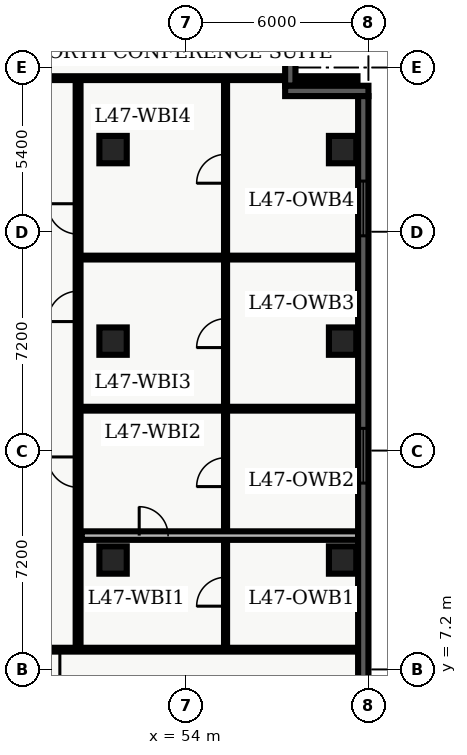
"""IFC4 building model, lengths in metres.
Left out: names, types, materials, properties, quantities, classifications, styles, units other than length and angle.
Written with IfcOpenShell. Run it as: python <this file> out.ifc"""

import sys

from ifc_helpers import new_model, entity, si_unit, converted_unit, direction, frame, origin_with_axes, origin_2d_with_axis, place, context, subcontext, project, spatial, polyline, rectangle, outline, extrude, element, fill, save


model = new_model("IFC4")
c1 = context("Model", 3, precision=1e-05, world=origin_with_axes(), true_north=direction((0.0, 1.0)))
c2 = subcontext(c1, "Body", "Model", "MODEL_VIEW")
j1 = project(units=[si_unit("LENGTHUNIT", "METRE"), converted_unit("PLANEANGLEUNIT", "DEGREE", entity("IfcPlaneAngleMeasure", 0.017), si_unit("PLANEANGLEUNIT", "RADIAN"), dimensions=[0, 0, 0, 0, 0, 0, 0])], contexts=[c1])
p1 = place(None, origin_with_axes())
s1 = spatial("IfcSite", under=j1, at=p1, CompositionType="ELEMENT")
p2 = place(p1, origin_with_axes())
s2 = spatial("IfcBuilding", under=s1, at=p2, CompositionType="ELEMENT")
p3 = place(p2, frame((0.0, 0.0, 192.6), z_axis=(0.0, 0.0, 1.0), x_axis=(1.0, 0.0, 0.0)))
s3 = spatial("IfcBuildingStorey", under=s2, at=p3, CompositionType="ELEMENT", Elevation=192.6)
for number, where, z_axis, x_axis in (
    (1, (51.6, 10.8, 0.0), (0.0, 0.0, 1.0), (1.0, 0.0, 0.0)),
    (2, (51.6, 18.0, 0.0), (0.0, 0.0, 1.0), (1.0, 0.0, 0.0)),
    (3, (51.6, 24.3, 0.0), (0.0, 0.0, 1.0), (1.0, 0.0, 0.0)),
    (4, (59.15, 10.8, 0.0), (0.0, 0.0, 1.0), (1.0, 0.0, 0.0)),
    (5, (59.15, 18.0, 0.0), (0.0, 0.0, 1.0), (1.0, 0.0, 0.0)),
    (6, (59.15, 24.3, 0.0), (0.0, 0.0, 1.0), (1.0, 0.0, 0.0)),
):
    element("IfcColumn", number, at=place(p3, frame(where, z_axis=z_axis, x_axis=x_axis)), inside=s3, PredefinedType="COLUMN", context=c2, shape_type="SweptSolid", body=[
        extrude(rectangle(XDim=0.9, YDim=0.9, at=origin_2d_with_axis()), origin_with_axes(), (0.0, 0.0, 1.0), 3.9),
    ])
p4 = place(p3, frame((50.45, 7.85, 0.0), z_axis=(0.0, 0.0, 1.0), x_axis=(0.0, 1.0, 0.0)))
e7 = element("IfcWall", 7, at=p4, inside=s3, PredefinedType="PARTITIONING", context=c2, shape_type="SweptSolid", body=[
    extrude(outline(polyline([(0.0, -0.08), (18.8, -0.08), (18.8, 0.08), (0.0, 0.08), (0.0, -0.08)])), origin_with_axes(), (0.0, 0.0, 1.0), 2.7),
])
p5 = place(p4, frame((5.84, 0.0, 0.0), z_axis=(0.0, 0.0, 1.0), x_axis=(1.0, 0.0, 0.0)))
e8 = element("IfcOpeningElement", 8, at=p5, cuts=e7, PredefinedType="OPENING", context=c2, shape_type="SweptSolid", body=[
    extrude(rectangle(XDim=1.0, YDim=0.18, at=origin_2d_with_axis()), origin_with_axes(), (0.0, 0.0, 1.0), 2.15),
])
p6 = place(p4, frame((11.293, 0.0, 0.0), z_axis=(0.0, 0.0, 1.0), x_axis=(1.0, 0.0, 0.0)))
e9 = element("IfcOpeningElement", 9, at=p6, cuts=e7, PredefinedType="OPENING", context=c2, shape_type="SweptSolid", body=[
    extrude(rectangle(XDim=1.0, YDim=0.18, at=origin_2d_with_axis()), origin_with_axes(), (0.0, 0.0, 1.0), 2.15),
])
p7 = place(p4, frame((14.169, 0.0, 0.0), z_axis=(0.0, 0.0, 1.0), x_axis=(1.0, 0.0, 0.0)))
e10 = element("IfcOpeningElement", 10, at=p7, cuts=e7, PredefinedType="OPENING", context=c2, shape_type="SweptSolid", body=[
    extrude(rectangle(XDim=1.0, YDim=0.18, at=origin_2d_with_axis()), origin_with_axes(), (0.0, 0.0, 1.0), 2.15),
])
p8 = place(p3, frame((59.665, 7.85, 0.0), z_axis=(0.0, 0.0, 1.0), x_axis=(-1.0, 0.0, 0.0)))
e11 = element("IfcWall", 11, at=p8, inside=s3, PredefinedType="PARTITIONING", context=c2, shape_type="SweptSolid", body=[
    extrude(outline(polyline([(0.0, -0.062), (11.615, -0.062), (11.615, 0.062), (0.0, 0.062), (0.0, -0.062)])), origin_with_axes(), (0.0, 0.0, 1.0), 2.7),
])
p9 = place(p8, frame((10.315, 0.0, 0.0), z_axis=(0.0, 0.0, 1.0), x_axis=(1.0, 0.0, 0.0)))
e12 = element("IfcOpeningElement", 12, at=p9, cuts=e11, PredefinedType="OPENING", context=c2, shape_type="SweptSolid", body=[
    extrude(rectangle(XDim=1.0, YDim=0.145, at=origin_2d_with_axis()), origin_with_axes(), (0.0, 0.0, 1.0), 2.15),
])
p10 = place(p3, frame((38.735, 26.65, 0.0), z_axis=(0.0, 0.0, 1.0), x_axis=(1.0, 0.0, 0.0)))
e13 = element("IfcWall", 13, at=p10, inside=s3, PredefinedType="PARTITIONING", context=c2, shape_type="SweptSolid", body=[
    extrude(outline(polyline([(0.0, -0.062), (20.905, -0.062), (20.905, 0.062), (0.0, 0.062), (0.0, -0.062)])), origin_with_axes(), (0.0, 0.0, 1.0), 2.7),
])
p11 = place(p10, frame((4.265, 0.0, 0.0), z_axis=(0.0, 0.0, 1.0), x_axis=(1.0, 0.0, 0.0)))
e14 = element("IfcOpeningElement", 14, at=p11, cuts=e13, PredefinedType="OPENING", context=c2, shape_type="SweptSolid", body=[
    extrude(rectangle(XDim=1.0, YDim=0.145, at=origin_2d_with_axis()), origin_with_axes(), (0.0, 0.0, 1.0), 2.15),
])
p12 = place(p3, frame((55.3, 7.98, 0.0), z_axis=(0.0, 0.0, 1.0), x_axis=(0.0, 1.0, 0.0)))
e15 = element("IfcWall", 15, at=p12, inside=s3, PredefinedType="PARTITIONING", context=c2, shape_type="SweptSolid", body=[
    extrude(outline(polyline([(0.0, -0.05), (18.54, -0.05), (18.54, 0.05), (0.0, 0.05), (0.0, -0.05)])), origin_with_axes(), (0.0, 0.0, 1.0), 2.7),
])
p13 = place(p12, frame((1.776, 0.0, 0.0), z_axis=(0.0, 0.0, 1.0), x_axis=(1.0, 0.0, 0.0)))
e16 = element("IfcOpeningElement", 16, at=p13, cuts=e15, PredefinedType="OPENING", context=c2, shape_type="SweptSolid", body=[
    extrude(rectangle(XDim=0.95, YDim=0.12, at=origin_2d_with_axis()), origin_with_axes(), (0.0, 0.0, 1.0), 2.15),
])
p14 = place(p12, frame((5.71, 0.0, 0.0), z_axis=(0.0, 0.0, 1.0), x_axis=(1.0, 0.0, 0.0)))
e17 = element("IfcOpeningElement", 17, at=p14, cuts=e15, PredefinedType="OPENING", context=c2, shape_type="SweptSolid", body=[
    extrude(rectangle(XDim=0.95, YDim=0.12, at=origin_2d_with_axis()), origin_with_axes(), (0.0, 0.0, 1.0), 2.15),
])
p15 = place(p12, frame((10.283, 0.0, 0.0), z_axis=(0.0, 0.0, 1.0), x_axis=(1.0, 0.0, 0.0)))
e18 = element("IfcOpeningElement", 18, at=p15, cuts=e15, PredefinedType="OPENING", context=c2, shape_type="SweptSolid", body=[
    extrude(rectangle(XDim=0.95, YDim=0.12, at=origin_2d_with_axis()), origin_with_axes(), (0.0, 0.0, 1.0), 2.15),
])
p16 = place(p12, frame((15.689, 0.0, 0.0), z_axis=(0.0, 0.0, 1.0), x_axis=(1.0, 0.0, 0.0)))
e19 = element("IfcOpeningElement", 19, at=p16, cuts=e15, PredefinedType="OPENING", context=c2, shape_type="SweptSolid", body=[
    extrude(rectangle(XDim=0.95, YDim=0.12, at=origin_2d_with_axis()), origin_with_axes(), (0.0, 0.0, 1.0), 2.15),
])
p17 = place(p3, frame((50.57, 11.603, 0.0), z_axis=(0.0, 0.0, 1.0), x_axis=(1.0, 0.0, 0.0)))
e20 = element("IfcWall", 20, at=p17, inside=s3, PredefinedType="PARTITIONING", context=c2, shape_type="SweptSolid", body=[
    extrude(outline(polyline([(0.0, -0.14), (9.095, -0.14), (9.095, 0.14), (0.0, 0.14), (0.0, -0.14)])), origin_with_axes(), (0.0, 0.0, 1.0), 2.7),
])
p18 = place(p17, frame((2.365, 0.0, 0.0), z_axis=(0.0, 0.0, 1.0), x_axis=(1.0, 0.0, 0.0)))
e21 = element("IfcOpeningElement", 21, at=p18, cuts=e20, PredefinedType="OPENING", context=c2, shape_type="SweptSolid", body=[
    extrude(rectangle(XDim=0.95, YDim=0.3, at=origin_2d_with_axis()), origin_with_axes(), (0.0, 0.0, 1.0), 2.15),
])
for number, where, z_axis, x_axis in (
    (22, (50.57, 15.777, 0.0), (0.0, 0.0, 1.0), (1.0, 0.0, 0.0)),
    (23, (50.57, 20.748, 0.0), (0.0, 0.0, 1.0), (1.0, 0.0, 0.0)),
):
    element("IfcWall", number, at=place(p3, frame(where, z_axis=z_axis, x_axis=x_axis)), inside=s3, PredefinedType="PARTITIONING", context=c2, shape_type="SweptSolid", body=[
        extrude(outline(polyline([(0.0, -0.062), (9.095, -0.062), (9.095, 0.062), (0.0, 0.062), (0.0, -0.062)])), origin_with_axes(), (0.0, 0.0, 1.0), 2.7),
    ])
p19 = place(p3, frame((57.43, 28.46, 0.0), z_axis=(0.0, 0.0, 1.0), x_axis=(0.0, -1.0, 0.0)))
e24 = element("IfcWall", 24, at=p19, inside=s3, PredefinedType="SOLIDWALL", context=c2, shape_type="SweptSolid", body=[
    extrude(outline(polyline([(0.0, -0.17), (2.06, -0.17), (2.06, 0.17), (0.0, 0.17), (0.0, -0.17)])), origin_with_axes(), (0.0, 0.0, 1.0), 3.66),
])
p20 = place(p3, frame((57.26, 26.23, 0.0), z_axis=(0.0, 0.0, 1.0), x_axis=(1.0, 0.0, 0.0)))
e25 = element("IfcWall", 25, at=p20, inside=s3, PredefinedType="SOLIDWALL", context=c2, shape_type="SweptSolid", body=[
    extrude(outline(polyline([(0.0, -0.17), (2.74, -0.17), (2.74, 0.17), (0.0, 0.17), (0.0, -0.17)])), origin_with_axes(), (0.0, 0.0, 1.0), 3.66),
])
p21 = place(p3, frame((59.83, 26.06, 0.0), z_axis=(0.0, 0.0, 1.0), x_axis=(0.0, -1.0, 0.0)))
e26 = element("IfcWall", 26, at=p21, inside=s3, PredefinedType="SOLIDWALL", context=c2, shape_type="SweptSolid", body=[
    extrude(outline(polyline([(0.0, -0.17), (23.66, -0.17), (23.66, 0.17), (0.0, 0.17), (0.0, -0.17)])), origin_with_axes(), (0.0, 0.0, 1.0), 3.66),
])
p22 = place(p21, frame((3.696, 0.0, 0.45), z_axis=(0.0, 0.0, 1.0), x_axis=(1.0, 0.0, 0.0)))
e27 = element("IfcOpeningElement", 27, at=p22, cuts=e26, PredefinedType="OPENING", context=c2, shape_type="SweptSolid", body=[
    extrude(rectangle(XDim=1.8, YDim=0.36, at=origin_2d_with_axis()), origin_with_axes(), (0.0, 0.0, 1.0), 2.1),
])
p23 = place(p21, frame((11.83, 0.0, 0.45), z_axis=(0.0, 0.0, 1.0), x_axis=(1.0, 0.0, 0.0)))
e28 = element("IfcOpeningElement", 28, at=p23, cuts=e26, PredefinedType="OPENING", context=c2, shape_type="SweptSolid", body=[
    extrude(rectangle(XDim=1.8, YDim=0.36, at=origin_2d_with_axis()), origin_with_axes(), (0.0, 0.0, 1.0), 2.1),
])
p24 = place(p21, frame((20.364, 0.0, 0.45), z_axis=(0.0, 0.0, 1.0), x_axis=(1.0, 0.0, 0.0)))
e29 = element("IfcOpeningElement", 29, at=p24, cuts=e26, PredefinedType="OPENING", context=c2, shape_type="SweptSolid", body=[
    extrude(rectangle(XDim=1.8, YDim=0.36, at=origin_2d_with_axis()), origin_with_axes(), (0.0, 0.0, 1.0), 2.1),
])
p25 = place(p8, frame((10.315, 0.0, 0.0), z_axis=(0.0, 0.0, 1.0), x_axis=(1.0, 0.0, 0.0)))
e30 = element("IfcDoor", 30, at=p25, inside=s3, OperationType="SINGLE_SWING_LEFT", PredefinedType="DOOR", context=c2, shape_type="SweptSolid", body=[
    extrude(rectangle(XDim=1.0, YDim=0.075, at=origin_2d_with_axis()), origin_with_axes(), (0.0, 0.0, 1.0), 2.15),
])
fill(e12, e30)
p26 = place(p12, frame((1.776, 0.0, 0.0), z_axis=(0.0, 0.0, 1.0), x_axis=(1.0, 0.0, 0.0)))
e31 = element("IfcDoor", 31, at=p26, inside=s3, OperationType="SINGLE_SWING_LEFT", PredefinedType="DOOR", context=c2, shape_type="SweptSolid", body=[
    extrude(rectangle(XDim=0.95, YDim=0.06, at=origin_2d_with_axis()), origin_with_axes(), (0.0, 0.0, 1.0), 2.15),
])
fill(e16, e31)
p27 = place(p17, frame((2.365, 0.0, 0.0), z_axis=(0.0, 0.0, 1.0), x_axis=(1.0, 0.0, 0.0)))
e32 = element("IfcDoor", 32, at=p27, inside=s3, OperationType="SINGLE_SWING_LEFT", PredefinedType="DOOR", context=c2, shape_type="SweptSolid", body=[
    extrude(rectangle(XDim=0.95, YDim=0.09, at=origin_2d_with_axis()), origin_with_axes(), (0.0, 0.0, 1.0), 2.15),
])
fill(e21, e32)
p28 = place(p12, frame((5.71, 0.0, 0.0), z_axis=(0.0, 0.0, 1.0), x_axis=(1.0, 0.0, 0.0)))
e33 = element("IfcDoor", 33, at=p28, inside=s3, OperationType="SINGLE_SWING_LEFT", PredefinedType="DOOR", context=c2, shape_type="SweptSolid", body=[
    extrude(rectangle(XDim=0.95, YDim=0.06, at=origin_2d_with_axis()), origin_with_axes(), (0.0, 0.0, 1.0), 2.15),
])
fill(e17, e33)
p29 = place(p4, frame((5.84, 0.0, 0.0), z_axis=(0.0, 0.0, 1.0), x_axis=(1.0, 0.0, 0.0)))
e34 = element("IfcDoor", 34, at=p29, inside=s3, OperationType="SINGLE_SWING_RIGHT", PredefinedType="DOOR", context=c2, shape_type="SweptSolid", body=[
    extrude(rectangle(XDim=1.0, YDim=0.09, at=origin_2d_with_axis()), origin_with_axes(), (0.0, 0.0, 1.0), 2.15),
])
fill(e8, e34)
p30 = place(p12, frame((10.283, 0.0, 0.0), z_axis=(0.0, 0.0, 1.0), x_axis=(1.0, 0.0, 0.0)))
e35 = element("IfcDoor", 35, at=p30, inside=s3, OperationType="SINGLE_SWING_LEFT", PredefinedType="DOOR", context=c2, shape_type="SweptSolid", body=[
    extrude(rectangle(XDim=0.95, YDim=0.06, at=origin_2d_with_axis()), origin_with_axes(), (0.0, 0.0, 1.0), 2.15),
])
fill(e18, e35)
p31 = place(p4, frame((11.293, 0.0, 0.0), z_axis=(0.0, 0.0, 1.0), x_axis=(1.0, 0.0, 0.0)))
e36 = element("IfcDoor", 36, at=p31, inside=s3, OperationType="SINGLE_SWING_LEFT", PredefinedType="DOOR", context=c2, shape_type="SweptSolid", body=[
    extrude(rectangle(XDim=1.0, YDim=0.09, at=origin_2d_with_axis()), origin_with_axes(), (0.0, 0.0, 1.0), 2.15),
])
fill(e9, e36)
p32 = place(p12, frame((15.689, 0.0, 0.0), z_axis=(0.0, 0.0, 1.0), x_axis=(1.0, 0.0, 0.0)))
e37 = element("IfcDoor", 37, at=p32, inside=s3, OperationType="SINGLE_SWING_LEFT", PredefinedType="DOOR", context=c2, shape_type="SweptSolid", body=[
    extrude(rectangle(XDim=0.95, YDim=0.06, at=origin_2d_with_axis()), origin_with_axes(), (0.0, 0.0, 1.0), 2.15),
])
fill(e19, e37)
p33 = place(p4, frame((14.169, 0.0, 0.0), z_axis=(0.0, 0.0, 1.0), x_axis=(1.0, 0.0, 0.0)))
e38 = element("IfcDoor", 38, at=p33, inside=s3, OperationType="SINGLE_SWING_RIGHT", PredefinedType="DOOR", context=c2, shape_type="SweptSolid", body=[
    extrude(rectangle(XDim=1.0, YDim=0.09, at=origin_2d_with_axis()), origin_with_axes(), (0.0, 0.0, 1.0), 2.15),
])
fill(e10, e38)
p34 = place(p21, frame((3.696, 0.0, 0.45), z_axis=(0.0, 0.0, 1.0), x_axis=(1.0, 0.0, 0.0)))
e39 = element("IfcWindow", 39, at=p34, inside=s3, PredefinedType="WINDOW", context=c2, shape_type="SweptSolid", body=[
    extrude(rectangle(XDim=1.8, YDim=0.09, at=origin_2d_with_axis()), origin_with_axes(), (0.0, 0.0, 1.0), 2.1),
])
fill(e27, e39)
p35 = place(p21, frame((11.83, 0.0, 0.45), z_axis=(0.0, 0.0, 1.0), x_axis=(1.0, 0.0, 0.0)))
e40 = element("IfcWindow", 40, at=p35, inside=s3, PredefinedType="WINDOW", context=c2, shape_type="SweptSolid", body=[
    extrude(rectangle(XDim=1.8, YDim=0.09, at=origin_2d_with_axis()), origin_with_axes(), (0.0, 0.0, 1.0), 2.1),
])
fill(e28, e40)
save(model, sys.argv[1])
